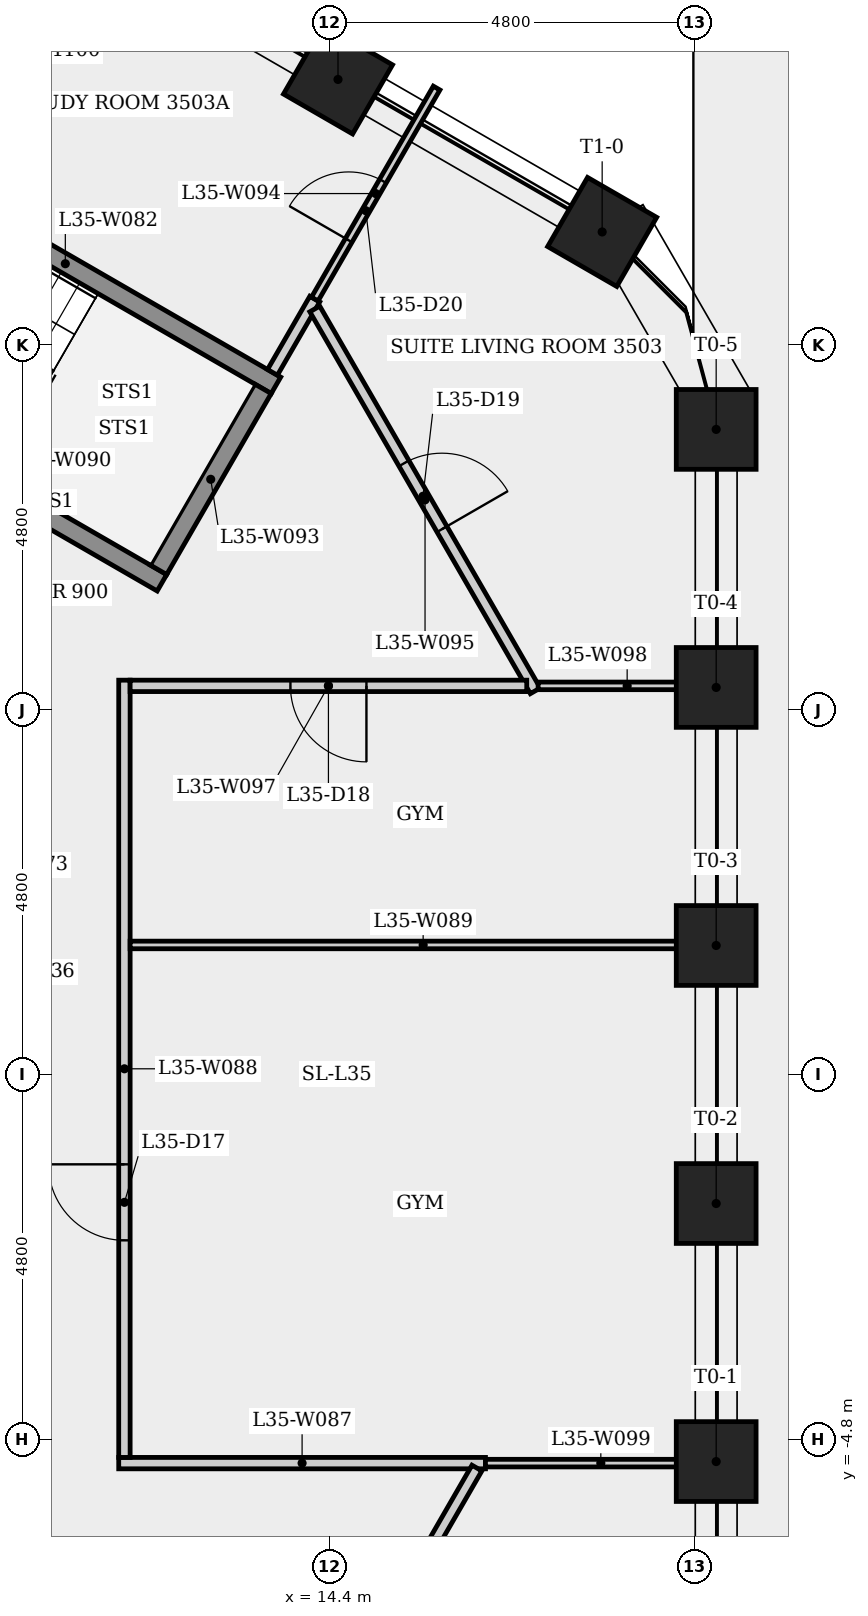
"""IFC4 building model, lengths in metres.
Left out: names, types, materials, properties, quantities, classifications, styles, units other than length and angle.
Written with IfcOpenShell. Run it as: python <this file> out.ifc"""

import sys

from ifc_helpers import new_model, si_unit, direction, frame, frame_2d, origin, origin_2d, place, context, subcontext, project, spatial, rectangle, extrude, element, fill, save


model = new_model("IFC4")
c1 = context("Model", 3, precision=1e-05, world=origin(), true_north=direction((0.0, 1.0)))
c2 = subcontext(c1, "Body", "Model", "MODEL_VIEW")
j1 = project(units=[si_unit("LENGTHUNIT", "METRE"), si_unit("PLANEANGLEUNIT", "RADIAN")], contexts=[c1])
p1 = place(None, origin())
s1 = spatial("IfcSite", under=j1, at=p1, CompositionType="ELEMENT")
p2 = place(p1, origin())
s2 = spatial("IfcBuilding", under=s1, at=p2, CompositionType="ELEMENT")
p3 = place(p2, frame((0.0, 0.0, 132.5)))
s3 = spatial("IfcBuildingStorey", under=s2, at=p3, CompositionType="ELEMENT", Elevation=132.5)
for number, where, z_axis, x_axis in (
    (1, (19.486, -5.093, 0.0), (0.0, 0.0, 1.0), (1.0, 0.0, 0.0)),
    (2, (19.486, -1.698, 0.0), (0.0, 0.0, 1.0), (1.0, 0.0, 0.0)),
    (3, (19.486, 1.698, 0.0), (0.0, 0.0, 1.0), (1.0, 0.0, 0.0)),
    (4, (19.486, 5.093, 0.0), (0.0, 0.0, 1.0), (1.0, 0.0, 0.0)),
    (5, (19.486, 8.488, 0.0), (0.0, 0.0, 1.0), (1.0, 0.0, 0.0)),
    (6, (17.986, 11.086, 0.0), (0.0, 0.0, 1.0), (0.5, 0.866, 0.0)),
    (7, (14.51, 13.093, 0.0), (0.0, 0.0, 1.0), (0.5, 0.866, 0.0)),
):
    element("IfcColumn", number, at=place(p3, frame(where, z_axis=z_axis, x_axis=x_axis)), inside=s3, PredefinedType="COLUMN", context=c2, shape_type="SweptSolid", body=[
        extrude(rectangle(XDim=1.05, YDim=1.05, at=origin_2d()), origin(), (0.0, 0.0, 1.0), 3.4),
    ])
p4 = place(p3, frame((8.151, 12.268, 0.0), z_axis=(0.0, 0.0, 1.0), x_axis=(0.866025499775, -0.499999833739, 0.0)))
e8 = element("IfcWall", 8, at=p4, inside=s3, PredefinedType="SHEAR", context=c2, shape_type="SweptSolid", body=[
    extrude(rectangle(XDim=6.4, YDim=0.25, at=frame_2d((3.2, 0.0))), origin(), (0.0, 0.0, 1.0), 3.0),
])
p5 = place(p3, frame((11.625, -5.113, 0.0), z_axis=(0.0, 0.0, 1.0), x_axis=(1.0, 0.0, 0.0)))
e9 = element("IfcWall", 9, at=p5, inside=s3, PredefinedType="PARTITIONING", context=c2, shape_type="SweptSolid", body=[
    extrude(rectangle(XDim=4.825, YDim=0.15, at=frame_2d((2.413, 0.0))), origin(), (0.0, 0.0, 1.0), 3.0),
])
p6 = place(p3, frame((11.7, -5.038, 0.0), z_axis=(0.0, 0.0, 1.0), x_axis=(0.0, 1.0, 0.0)))
e10 = element("IfcWall", 10, at=p6, inside=s3, PredefinedType="PARTITIONING", context=c2, shape_type="SweptSolid", body=[
    extrude(rectangle(XDim=10.227, YDim=0.15, at=frame_2d((5.113, 0.0))), origin(), (0.0, 0.0, 1.0), 3.0),
])
p7 = place(p6, frame((2.856, 0.0, 0.0)))
e11 = element("IfcOpeningElement", 11, at=p7, cuts=e10, PredefinedType="OPENING", context=c2, shape_type="SweptSolid", body=[
    extrude(rectangle(XDim=1.0, YDim=2.1, at=frame_2d((0.5, 1.05))), frame((0.0, 0.085, 0.0), z_axis=(0.0, -1.0, 0.0), x_axis=(1.0, 0.0, 0.0)), (0.0, 0.0, 1.0), 0.17),
])
p8 = place(p3, frame((11.775, 1.705, 0.0), z_axis=(0.0, 0.0, 1.0), x_axis=(1.0, 0.0, 0.0)))
e12 = element("IfcWall", 12, at=p8, inside=s3, PredefinedType="PARTITIONING", context=c2, shape_type="SweptSolid", body=[
    extrude(rectangle(XDim=7.711, YDim=0.1, at=frame_2d((3.855, 0.0))), origin(), (0.0, 0.0, 1.0), 3.0),
])
p9 = place(p3, frame((12.194, 6.47, 0.0), z_axis=(0.0, 0.0, 1.0), x_axis=(-0.866025499775, 0.499999833739, 0.0)))
e13 = element("IfcWall", 13, at=p9, inside=s3, PredefinedType="SHEAR", context=c2, shape_type="SweptSolid", body=[
    extrude(rectangle(XDim=6.4, YDim=0.25, at=frame_2d((3.2, 0.0))), origin(), (0.0, 0.0, 1.0), 3.0),
])
p10 = place(p9, frame((5.25, 0.0, 0.0)))
e14 = element("IfcOpeningElement", 14, at=p10, cuts=e13, PredefinedType="OPENING", context=c2, shape_type="SweptSolid", body=[
    extrude(rectangle(XDim=1.0, YDim=2.1, at=frame_2d((0.5, 1.05))), frame((0.0, 0.135, 0.0), z_axis=(0.0, -1.0, 0.0), x_axis=(1.0, 0.0, 0.0)), (0.0, 0.0, 1.0), 0.27),
])
p11 = place(p3, frame((13.648, 9.239, 0.0), z_axis=(0.0, 0.0, 1.0), x_axis=(0.500171649313, 0.865926279324, 0.0)))
e15 = element("IfcWall", 15, at=p11, inside=s3, PredefinedType="PARTITIONING", context=c2, shape_type="SweptSolid", body=[
    extrude(rectangle(XDim=1.113, YDim=0.15, at=frame_2d((0.557, 0.0))), origin(), (0.0, 0.0, 1.0), 3.0),
])
p12 = place(p3, frame((13.523, 9.022, 0.0), z_axis=(0.0, 0.0, 1.0), x_axis=(-0.500034990121, -0.866005201286, 0.0)))
e16 = element("IfcWall", 16, at=p12, inside=s3, PredefinedType="SHEAR", context=c2, shape_type="SweptSolid", body=[
    extrude(rectangle(XDim=2.75, YDim=0.25, at=frame_2d((1.375, 0.0))), origin(), (0.0, 0.0, 1.0), 3.0),
])
p13 = place(p3, frame((14.205, 10.203, 0.0), z_axis=(0.0, 0.0, 1.0), x_axis=(0.499988314375, 0.866032150378, 0.0)))
e17 = element("IfcWall", 17, at=p13, inside=s3, PredefinedType="PARTITIONING", context=c2, shape_type="SweptSolid", body=[
    extrude(rectangle(XDim=3.206, YDim=0.1, at=frame_2d((1.603, 0.0))), origin(), (0.0, 0.0, 1.0), 3.0),
])
p14 = place(p13, frame((0.893, 0.0, 0.0)))
e18 = element("IfcOpeningElement", 18, at=p14, cuts=e17, PredefinedType="OPENING", context=c2, shape_type="SweptSolid", body=[
    extrude(rectangle(XDim=0.9, YDim=2.1, at=frame_2d((0.45, 1.05))), frame((0.0, 0.06, 0.0), z_axis=(0.0, -1.0, 0.0), x_axis=(1.0, 0.0, 0.0)), (0.0, 0.0, 1.0), 0.12),
])
p15 = place(p3, frame((14.205, 10.073, 0.0), z_axis=(0.0, 0.0, 1.0), x_axis=(0.500017486934, -0.866015307463, 0.0)))
e19 = element("IfcWall", 19, at=p15, inside=s3, PredefinedType="PARTITIONING", context=c2, shape_type="SweptSolid", body=[
    extrude(rectangle(XDim=5.802, YDim=0.15, at=frame_2d((2.901, 0.0))), origin(), (0.0, 0.0, 1.0), 3.0),
])
p16 = place(p15, frame((2.346, 0.0, 0.0)))
e20 = element("IfcOpeningElement", 20, at=p16, cuts=e19, PredefinedType="OPENING", context=c2, shape_type="SweptSolid", body=[
    extrude(rectangle(XDim=1.0, YDim=2.1, at=frame_2d((0.5, 1.05))), frame((0.0, 0.085, 0.0), z_axis=(0.0, -1.0, 0.0), x_axis=(1.0, 0.0, 0.0)), (0.0, 0.0, 1.0), 0.17),
])
p17 = place(p3, frame((16.338, -5.178, 0.0), z_axis=(0.0, 0.0, 1.0), x_axis=(-0.499973348067, -0.866040790738, 0.0)))
e21 = element("IfcWall", 21, at=p17, inside=s3, PredefinedType="PARTITIONING", context=c2, shape_type="SweptSolid", body=[
    extrude(rectangle(XDim=8.423, YDim=0.15, at=frame_2d((4.212, 0.0))), origin(), (0.0, 0.0, 1.0), 3.0),
])
p18 = place(p17, frame((3.712, 0.0, 0.0)))
e22 = element("IfcOpeningElement", 22, at=p18, cuts=e21, PredefinedType="OPENING", context=c2, shape_type="SweptSolid", body=[
    extrude(rectangle(XDim=1.0, YDim=2.1, at=frame_2d((0.5, 1.05))), frame((0.0, 0.085, 0.0), z_axis=(0.0, -1.0, 0.0), x_axis=(1.0, 0.0, 0.0)), (0.0, 0.0, 1.0), 0.17),
])
p19 = place(p3, frame((16.993, 5.113, 0.0), z_axis=(0.0, 0.0, 1.0), x_axis=(-1.0, 0.0, 0.0)))
e23 = element("IfcWall", 23, at=p19, inside=s3, PredefinedType="PARTITIONING", context=c2, shape_type="SweptSolid", body=[
    extrude(rectangle(XDim=5.218, YDim=0.15, at=frame_2d((2.609, 0.0))), origin(), (0.0, 0.0, 1.0), 3.0),
])
p20 = place(p19, frame((2.109, 0.0, 0.0)))
e24 = element("IfcOpeningElement", 24, at=p20, cuts=e23, PredefinedType="OPENING", context=c2, shape_type="SweptSolid", body=[
    extrude(rectangle(XDim=1.0, YDim=2.1, at=frame_2d((0.5, 1.05))), frame((0.0, 0.085, 0.0), z_axis=(0.0, -1.0, 0.0), x_axis=(1.0, 0.0, 0.0)), (0.0, 0.0, 1.0), 0.17),
])
p21 = place(p3, frame((17.143, 5.113, 0.0), z_axis=(0.0, 0.0, 1.0), x_axis=(1.0, 0.0, 0.0)))
e25 = element("IfcWall", 25, at=p21, inside=s3, PredefinedType="PARTITIONING", context=c2, shape_type="SweptSolid", body=[
    extrude(rectangle(XDim=2.343, YDim=0.1, at=frame_2d((1.171, 0.0))), origin(), (0.0, 0.0, 1.0), 3.0),
])
p22 = place(p3, frame((19.486, -5.113, 0.0), z_axis=(0.0, 0.0, 1.0), x_axis=(-1.0, 0.0, 0.0)))
e26 = element("IfcWall", 26, at=p22, inside=s3, PredefinedType="PARTITIONING", context=c2, shape_type="SweptSolid", body=[
    extrude(rectangle(XDim=3.035, YDim=0.1, at=frame_2d((1.518, 0.0))), origin(), (0.0, 0.0, 1.0), 3.0),
])
p23 = place(p7, origin())
e27 = element("IfcDoor", 27, at=p23, inside=s3, OperationType="SINGLE_SWING_RIGHT", PredefinedType="DOOR", context=c2, shape_type="SweptSolid", body=[
    extrude(rectangle(XDim=1.0, YDim=2.1, at=frame_2d((0.5, 1.05))), frame((0.0, 0.025, 0.0), z_axis=(0.0, -1.0, 0.0), x_axis=(1.0, 0.0, 0.0)), (0.0, 0.0, 1.0), 0.05),
])
fill(e11, e27)
p24 = place(p20, origin())
e28 = element("IfcDoor", 28, at=p24, inside=s3, OperationType="SINGLE_SWING_LEFT", PredefinedType="DOOR", context=c2, shape_type="SweptSolid", body=[
    extrude(rectangle(XDim=1.0, YDim=2.1, at=frame_2d((0.5, 1.05))), frame((0.0, 0.025, 0.0), z_axis=(0.0, -1.0, 0.0), x_axis=(1.0, 0.0, 0.0)), (0.0, 0.0, 1.0), 0.05),
])
fill(e24, e28)
p25 = place(p16, origin())
e29 = element("IfcDoor", 29, at=p25, inside=s3, OperationType="SINGLE_SWING_RIGHT", PredefinedType="DOOR", context=c2, shape_type="SweptSolid", body=[
    extrude(rectangle(XDim=1.0, YDim=2.1, at=frame_2d((0.5, 1.05))), frame((0.0, 0.025, 0.0), z_axis=(0.0, -1.0, 0.0), x_axis=(1.0, 0.0, 0.0)), (0.0, 0.0, 1.0), 0.05),
])
fill(e20, e29)
p26 = place(p14, origin())
e30 = element("IfcDoor", 30, at=p26, inside=s3, OperationType="SINGLE_SWING_LEFT", PredefinedType="DOOR", context=c2, shape_type="SweptSolid", body=[
    extrude(rectangle(XDim=0.9, YDim=2.1, at=frame_2d((0.45, 1.05))), frame((0.0, 0.025, 0.0), z_axis=(0.0, -1.0, 0.0), x_axis=(1.0, 0.0, 0.0)), (0.0, 0.0, 1.0), 0.05),
])
fill(e18, e30)
save(model, sys.argv[1])
